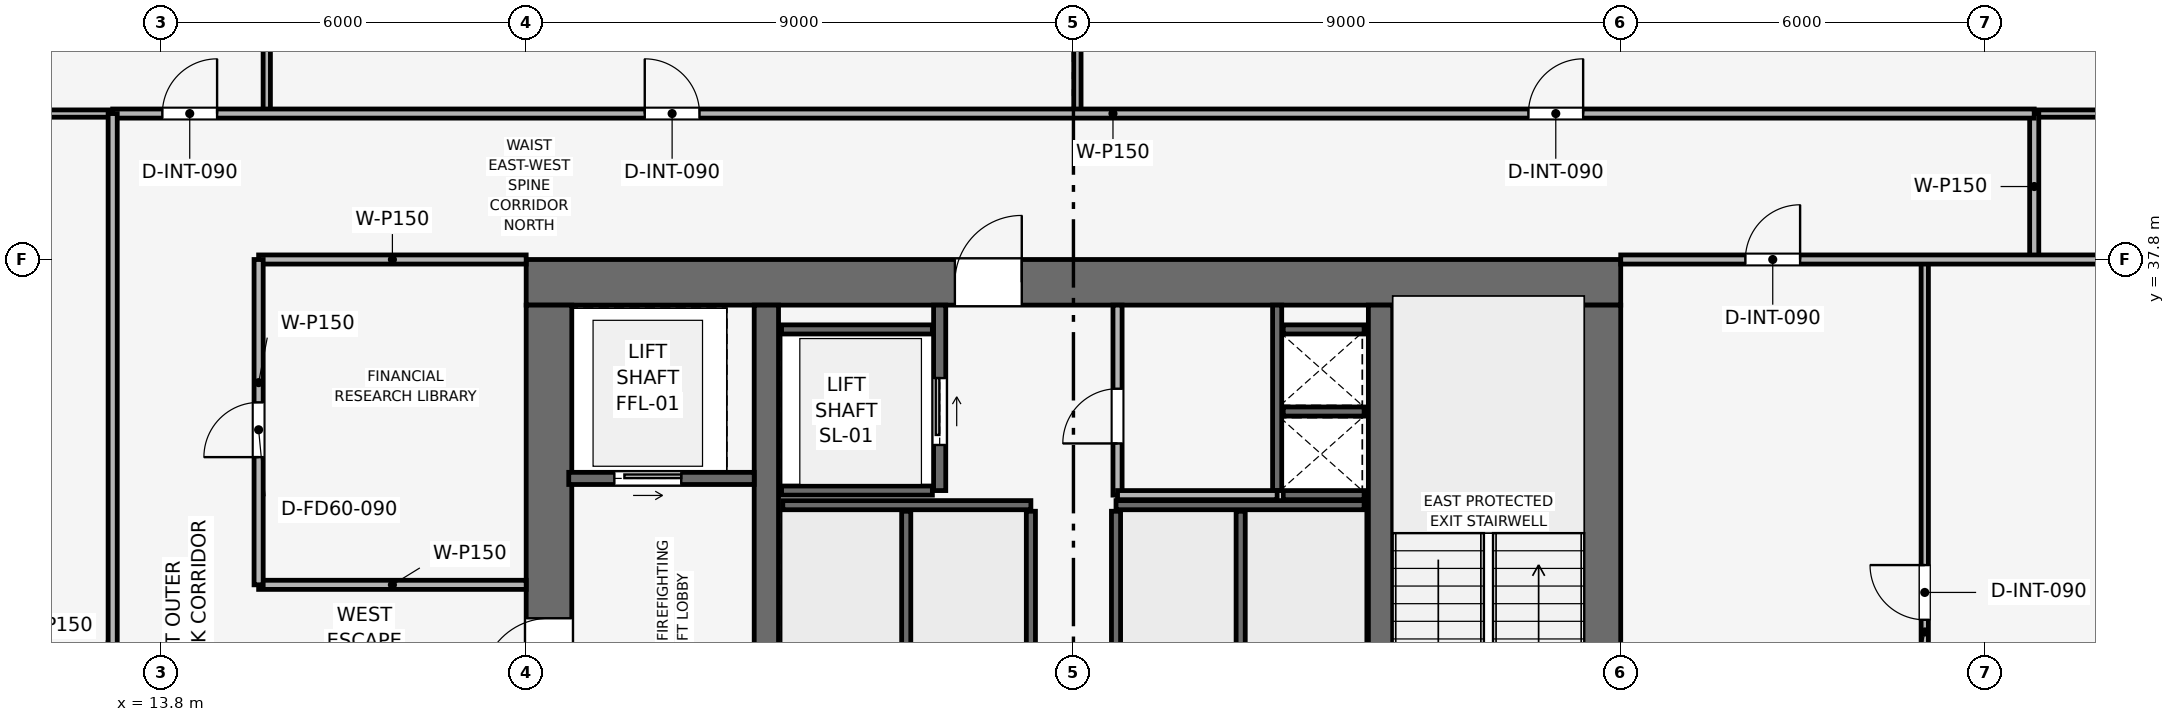
"""IFC4 building model, lengths in metres.
Left out: names, types, materials, properties, quantities, classifications, styles, units other than length and angle.
Written with IfcOpenShell. Run it as: python <this file> out.ifc"""

import sys

from ifc_helpers import new_model, si_unit, direction, frame, frame_2d, origin, place, context, subcontext, project, spatial, rectangle, extrude, element, fill, save


model = new_model("IFC4")
c1 = context("Model", 3, precision=1e-05, world=origin(), true_north=direction((0.0, 1.0)))
c2 = subcontext(c1, "Body", "Model", "MODEL_VIEW")
j1 = project(units=[si_unit("LENGTHUNIT", "METRE"), si_unit("PLANEANGLEUNIT", "RADIAN")], contexts=[c1])
p1 = place(None, origin())
s1 = spatial("IfcSite", under=j1, at=p1, CompositionType="ELEMENT")
p2 = place(p1, origin())
s2 = spatial("IfcBuilding", under=s1, at=p2, CompositionType="ELEMENT")
p3 = place(p2, frame((0.0, 0.0, 226.2)))
s3 = spatial("IfcBuildingStorey", under=s2, at=p3, CompositionType="ELEMENT", Elevation=226.2)
p4 = place(p3, frame((19.8, 37.425, 0.0), z_axis=(0.0, 0.0, 1.0), x_axis=(1.0, 0.0, 0.0)))
e1 = element("IfcWall", 1, at=p4, inside=s3, PredefinedType="SHEAR", context=c2, shape_type="SweptSolid", body=[
    extrude(rectangle(XDim=18.0, YDim=0.75, at=frame_2d((9.0, 0.0))), origin(), (0.0, 0.0, 1.0), 3.75),
])
p5 = place(p4, frame((7.05, 0.0, 0.0)))
e2 = element("IfcOpeningElement", 2, at=p5, cuts=e1, PredefinedType="OPENING", context=c2, shape_type="SweptSolid", body=[
    extrude(rectangle(XDim=1.1, YDim=2.15, at=frame_2d((0.55, 1.075))), frame((0.0, 0.385, 0.0), z_axis=(0.0, -1.0, 0.0), x_axis=(1.0, 0.0, 0.0)), (0.0, 0.0, 1.0), 0.77),
])
p6 = place(p3, frame((20.175, 20.55, 0.0), z_axis=(0.0, 0.0, 1.0), x_axis=(0.0, 1.0, 0.0)))
e3 = element("IfcWall", 3, at=p6, inside=s3, PredefinedType="SHEAR", context=c2, shape_type="SweptSolid", body=[
    extrude(rectangle(XDim=16.5, YDim=0.75, at=frame_2d((8.25, 0.0))), origin(), (0.0, 0.0, 1.0), 3.75),
])
p7 = place(p6, frame((10.25, 0.0, 0.0)))
e4 = element("IfcOpeningElement", 4, at=p7, cuts=e3, PredefinedType="OPENING", context=c2, shape_type="SweptSolid", body=[
    extrude(rectangle(XDim=1.1, YDim=2.15, at=frame_2d((0.55, 1.075))), frame((0.0, 0.385, 0.0), z_axis=(0.0, -1.0, 0.0), x_axis=(1.0, 0.0, 0.0)), (0.0, 0.0, 1.0), 0.77),
])
p8 = place(p3, frame((37.425, 20.55, 0.0), z_axis=(0.0, 0.0, 1.0), x_axis=(0.0, 1.0, 0.0)))
e5 = element("IfcWall", 5, at=p8, inside=s3, PredefinedType="SHEAR", context=c2, shape_type="SweptSolid", body=[
    extrude(rectangle(XDim=16.5, YDim=0.75, at=frame_2d((8.25, 0.0))), origin(), (0.0, 0.0, 1.0), 3.75),
])
p9 = place(p8, frame((4.75, 0.0, 0.0)))
e6 = element("IfcOpeningElement", 6, at=p9, cuts=e5, PredefinedType="OPENING", context=c2, shape_type="SweptSolid", body=[
    extrude(rectangle(XDim=1.1, YDim=2.15, at=frame_2d((0.55, 1.075))), frame((0.0, 0.385, 0.0), z_axis=(0.0, -1.0, 0.0), x_axis=(1.0, 0.0, 0.0)), (0.0, 0.0, 1.0), 0.77),
])
for number, where, z_axis, x_axis in (
    (7, (23.75, 20.55, 0.0), (0.0, 0.0, 1.0), (0.0, 1.0, 0.0)),
    (8, (33.85, 20.55, 0.0), (0.0, 0.0, 1.0), (0.0, 1.0, 0.0)),
):
    element("IfcWall", number, at=place(p3, frame(where, z_axis=z_axis, x_axis=x_axis)), inside=s3, PredefinedType="SHEAR", context=c2, shape_type="SweptSolid", body=[
        extrude(rectangle(XDim=16.5, YDim=0.4, at=frame_2d((8.25, 0.0))), origin(), (0.0, 0.0, 1.0), 3.75),
    ])
p10 = place(p3, frame((32.15, 34.0, 0.0), z_axis=(0.0, 0.0, 1.0), x_axis=(0.0, 1.0, 0.0)))
e9 = element("IfcWall", 9, at=p10, inside=s3, PredefinedType="SHEAR", context=c2, shape_type="SweptSolid", body=[
    extrude(rectangle(XDim=3.05, YDim=0.15, at=frame_2d((1.525, 0.0))), origin(), (0.0, 0.0, 1.0), 3.5),
])
for number, where, z_axis, x_axis in (
    (10, (32.25, 33.925, 0.0), (0.0, 0.0, 1.0), (1.0, 0.0, 0.0)),
    (11, (32.25, 35.3, 0.0), (0.0, 0.0, 1.0), (1.0, 0.0, 0.0)),
):
    element("IfcWall", number, at=place(p3, frame(where, z_axis=z_axis, x_axis=x_axis)), inside=s3, PredefinedType="SHEAR", context=c2, shape_type="SweptSolid", body=[
        extrude(rectangle(XDim=1.33, YDim=0.15, at=frame_2d((0.665, 0.0))), origin(), (0.0, 0.0, 1.0), 3.5),
    ])
p11 = place(p3, frame((20.5, 34.2, 0.0), z_axis=(0.0, 0.0, 1.0), x_axis=(1.0, 0.0, 0.0)))
e12 = element("IfcWall", 12, at=p11, inside=s3, PredefinedType="SHEAR", context=c2, shape_type="SweptSolid", body=[
    extrude(rectangle(XDim=3.05, YDim=0.2, at=frame_2d((1.525, 0.0))), origin(), (0.0, 0.0, 1.0), 3.5),
])
p12 = place(p11, frame((0.75, 0.0, 0.0)))
e13 = element("IfcOpeningElement", 13, at=p12, cuts=e12, PredefinedType="OPENING", context=c2, shape_type="SweptSolid", body=[
    extrude(rectangle(XDim=1.1, YDim=2.15, at=frame_2d((0.55, 1.075))), frame((0.0, 0.11, 0.0), z_axis=(0.0, -1.0, 0.0), x_axis=(1.0, 0.0, 0.0)), (0.0, 0.0, 1.0), 0.22),
])
p13 = place(p3, frame((26.6, 34.0, 0.0), z_axis=(0.0, 0.0, 1.0), x_axis=(0.0, 1.0, 0.0)))
e14 = element("IfcWall", 14, at=p13, inside=s3, PredefinedType="SHEAR", context=c2, shape_type="SweptSolid", body=[
    extrude(rectangle(XDim=3.05, YDim=0.2, at=frame_2d((1.525, 0.0))), origin(), (0.0, 0.0, 1.0), 3.5),
])
p14 = place(p13, frame((0.75, 0.0, 0.0)))
e15 = element("IfcOpeningElement", 15, at=p14, cuts=e14, PredefinedType="OPENING", context=c2, shape_type="SweptSolid", body=[
    extrude(rectangle(XDim=1.1, YDim=2.15, at=frame_2d((0.55, 1.075))), frame((0.0, 0.11, 0.0), z_axis=(0.0, -1.0, 0.0), x_axis=(1.0, 0.0, 0.0)), (0.0, 0.0, 1.0), 0.22),
])
for number, where, z_axis, x_axis in (
    (16, (24.0, 34.0, 0.0), (0.0, 0.0, 1.0), (1.0, 0.0, 0.0)),
    (17, (24.0, 36.65, 0.0), (0.0, 0.0, 1.0), (1.0, 0.0, 0.0)),
):
    element("IfcWall", number, at=place(p3, frame(where, z_axis=z_axis, x_axis=x_axis)), inside=s3, PredefinedType="SHEAR", context=c2, shape_type="SweptSolid", body=[
        extrude(rectangle(XDim=2.48, YDim=0.15, at=frame_2d((1.24, 0.0))), origin(), (0.0, 0.0, 1.0), 3.5),
    ])
p15 = place(p3, frame((32.25, 36.65, 0.0), z_axis=(0.0, 0.0, 1.0), x_axis=(1.0, 0.0, 0.0)))
e18 = element("IfcWall", 18, at=p15, inside=s3, PredefinedType="SHEAR", context=c2, shape_type="SweptSolid", body=[
    extrude(rectangle(XDim=1.33, YDim=0.15, at=frame_2d((0.665, 0.0))), origin(), (0.0, 0.0, 1.0), 3.5),
])
for number, where, z_axis, x_axis in (
    (19, (24.02, 33.76, 0.0), (0.0, 0.0, 1.0), (1.0, 0.0, 0.0)),
    (20, (29.5, 33.76, 0.0), (0.0, 0.0, 1.0), (1.0, 0.0, 0.0)),
):
    element("IfcWall", number, at=place(p3, frame(where, z_axis=z_axis, x_axis=x_axis)), inside=s3, PredefinedType="SHEAR", context=c2, shape_type="SweptSolid", body=[
        extrude(rectangle(XDim=4.08, YDim=0.15, at=frame_2d((2.04, 0.0))), origin(), (0.0, 0.0, 1.0), 3.5),
    ])
for number, where, z_axis, x_axis in (
    (21, (26.05, 31.42, 0.0), (0.0, 0.0, 1.0), (0.0, 1.0, 0.0)),
    (22, (28.1, 31.42, 0.0), (0.0, 0.0, 1.0), (0.0, 1.0, 0.0)),
    (23, (29.5, 31.42, 0.0), (0.0, 0.0, 1.0), (0.0, 1.0, 0.0)),
    (24, (31.55, 31.42, 0.0), (0.0, 0.0, 1.0), (0.0, 1.0, 0.0)),
):
    element("IfcWall", number, at=place(p3, frame(where, z_axis=z_axis, x_axis=x_axis)), inside=s3, PredefinedType="SHEAR", context=c2, shape_type="SweptSolid", body=[
        extrude(rectangle(XDim=2.24, YDim=0.15, at=frame_2d((1.12, 0.0))), origin(), (0.0, 0.0, 1.0), 3.5),
    ])
p16 = place(p3, frame((29.525, 33.925, 0.0), z_axis=(0.0, 0.0, 1.0), x_axis=(0.0, 1.0, 0.0)))
e25 = element("IfcWall", 25, at=p16, inside=s3, PredefinedType="PARTITIONING", context=c2, shape_type="SweptSolid", body=[
    extrude(rectangle(XDim=3.125, YDim=0.15, at=frame_2d((1.562, 0.0))), origin(), (0.0, 0.0, 1.0), 3.5),
])
p17 = place(p16, frame((0.85, 0.0, 0.0)))
e26 = element("IfcOpeningElement", 26, at=p17, cuts=e25, PredefinedType="OPENING", context=c2, shape_type="SweptSolid", body=[
    extrude(rectangle(XDim=0.9, YDim=2.1, at=frame_2d((0.45, 1.05))), frame((0.0, 0.085, 0.0), z_axis=(0.0, -1.0, 0.0), x_axis=(1.0, 0.0, 0.0)), (0.0, 0.0, 1.0), 0.17),
])
p18 = place(p3, frame((29.525, 33.925, 0.0), z_axis=(0.0, 0.0, 1.0), x_axis=(1.0, 0.0, 0.0)))
e27 = element("IfcWall", 27, at=p18, inside=s3, PredefinedType="PARTITIONING", context=c2, shape_type="SweptSolid", body=[
    extrude(rectangle(XDim=2.625, YDim=0.15, at=frame_2d((1.312, 0.0))), origin(), (0.0, 0.0, 1.0), 3.5),
])
p19 = place(p3, frame((15.4, 32.45, 0.0), z_axis=(0.0, 0.0, 1.0), x_axis=(1.0, 0.0, 0.0)))
e28 = element("IfcWall", 28, at=p19, inside=s3, PredefinedType="PARTITIONING", context=c2, shape_type="SweptSolid", body=[
    extrude(rectangle(XDim=4.4, YDim=0.15, at=frame_2d((2.2, 0.0))), origin(), (0.0, 0.0, 1.0), 3.5),
])
p20 = place(p3, frame((15.4, 37.8, 0.0), z_axis=(0.0, 0.0, 1.0), x_axis=(1.0, 0.0, 0.0)))
e29 = element("IfcWall", 29, at=p20, inside=s3, PredefinedType="PARTITIONING", context=c2, shape_type="SweptSolid", body=[
    extrude(rectangle(XDim=4.4, YDim=0.15, at=frame_2d((2.2, 0.0))), origin(), (0.0, 0.0, 1.0), 3.035),
])
p21 = place(p3, frame((15.4, 32.45, 0.0), z_axis=(0.0, 0.0, 1.0), x_axis=(0.0, 1.0, 0.0)))
e30 = element("IfcWall", 30, at=p21, inside=s3, PredefinedType="PARTITIONING", context=c2, shape_type="SweptSolid", body=[
    extrude(rectangle(XDim=5.35, YDim=0.15, at=frame_2d((2.675, 0.0))), origin(), (0.0, 0.0, 1.0), 3.035),
])
p22 = place(p21, frame((2.1, 0.0, 0.0)))
e31 = element("IfcOpeningElement", 31, at=p22, cuts=e30, PredefinedType="OPENING", context=c2, shape_type="SweptSolid", body=[
    extrude(rectangle(XDim=0.9, YDim=2.1, at=frame_2d((0.45, 1.05))), frame((0.0, 0.085, 0.0), z_axis=(0.0, -1.0, 0.0), x_axis=(1.0, 0.0, 0.0)), (0.0, 0.0, 1.0), 0.17),
])
p23 = place(p3, frame((15.534, 40.2, 0.0), z_axis=(0.0, 0.0, 1.0), x_axis=(0.0, 1.0, 0.0)))
e32 = element("IfcWall", 32, at=p23, inside=s3, PredefinedType="PARTITIONING", context=c2, shape_type="SweptSolid", body=[
    extrude(rectangle(XDim=15.47, YDim=0.12, at=frame_2d((7.735, 0.0))), origin(), (0.0, 0.0, 1.0), 2.885),
])
p24 = place(p3, frame((28.865, 40.2, 0.0), z_axis=(0.0, 0.0, 1.0), x_axis=(0.0, 1.0, 0.0)))
e33 = element("IfcWall", 33, at=p24, inside=s3, PredefinedType="PARTITIONING", context=c2, shape_type="SweptSolid", body=[
    extrude(rectangle(XDim=15.47, YDim=0.12, at=frame_2d((7.735, 0.0))), origin(), (0.0, 0.0, 1.0), 2.985),
])
p25 = place(p3, frame((42.8, 26.85, 0.0), z_axis=(0.0, 0.0, 1.0), x_axis=(0.0, 1.0, 0.0)))
e34 = element("IfcWall", 34, at=p25, inside=s3, PredefinedType="PARTITIONING", context=c2, shape_type="SweptSolid", body=[
    extrude(rectangle(XDim=10.95, YDim=0.12, at=frame_2d((5.475, 0.0))), origin(), (0.0, 0.0, 1.0), 3.035),
])
p26 = place(p25, frame((5.025, 0.0, 0.0)))
e35 = element("IfcOpeningElement", 35, at=p26, cuts=e34, PredefinedType="OPENING", context=c2, shape_type="SweptSolid", body=[
    extrude(rectangle(XDim=0.9, YDim=2.1, at=frame_2d((0.45, 1.05))), frame((0.0, 0.07, 0.0), z_axis=(0.0, -1.0, 0.0), x_axis=(1.0, 0.0, 0.0)), (0.0, 0.0, 1.0), 0.14),
])
p27 = place(p3, frame((1.93, 40.2, 0.0), z_axis=(0.0, 0.0, 1.0), x_axis=(1.0, 0.0, 0.0)))
e36 = element("IfcWall", 36, at=p27, inside=s3, PredefinedType="PARTITIONING", context=c2, shape_type="SweptSolid", body=[
    extrude(rectangle(XDim=11.07, YDim=0.12, at=frame_2d((5.535, 0.0))), origin(), (0.0, 0.0, 1.0), 2.885),
])
p28 = place(p3, frame((44.6, 40.2, 0.0), z_axis=(0.0, 0.0, 1.0), x_axis=(1.0, 0.0, 0.0)))
e37 = element("IfcWall", 37, at=p28, inside=s3, PredefinedType="PARTITIONING", context=c2, shape_type="SweptSolid", body=[
    extrude(rectangle(XDim=11.07, YDim=0.12, at=frame_2d((5.535, 0.0))), origin(), (0.0, 0.0, 1.0), 2.885),
])
p29 = place(p3, frame((44.6, 37.8, 0.0), z_axis=(0.0, 0.0, 1.0), x_axis=(0.0, 1.0, 0.0)))
e38 = element("IfcWall", 38, at=p29, inside=s3, PredefinedType="PARTITIONING", context=c2, shape_type="SweptSolid", body=[
    extrude(rectangle(XDim=2.4, YDim=0.15, at=frame_2d((1.2, 0.0))), origin(), (0.0, 0.0, 1.0), 3.5),
])
p30 = place(p3, frame((37.8, 37.8, 0.0), z_axis=(0.0, 0.0, 1.0), x_axis=(1.0, 0.0, 0.0)))
e39 = element("IfcWall", 39, at=p30, inside=s3, PredefinedType="PARTITIONING", context=c2, shape_type="SweptSolid", body=[
    extrude(rectangle(XDim=17.87, YDim=0.15, at=frame_2d((8.935, 0.0))), origin(), (0.0, 0.0, 1.0), 2.885),
])
p31 = place(p30, frame((2.05, 0.0, 0.0)))
e40 = element("IfcOpeningElement", 40, at=p31, cuts=e39, PredefinedType="OPENING", context=c2, shape_type="SweptSolid", body=[
    extrude(rectangle(XDim=0.9, YDim=2.1, at=frame_2d((0.45, 1.05))), frame((0.0, 0.085, 0.0), z_axis=(0.0, -1.0, 0.0), x_axis=(1.0, 0.0, 0.0)), (0.0, 0.0, 1.0), 0.17),
])
p32 = place(p3, frame((13.0, 40.2, 0.0), z_axis=(0.0, 0.0, 1.0), x_axis=(1.0, 0.0, 0.0)))
e41 = element("IfcWall", 41, at=p32, inside=s3, PredefinedType="PARTITIONING", context=c2, shape_type="SweptSolid", body=[
    extrude(rectangle(XDim=31.6, YDim=0.15, at=frame_2d((15.8, 0.0))), origin(), (0.0, 0.0, 1.0), 3.035),
])
p33 = place(p32, frame((0.817, 0.0, 0.0)))
e42 = element("IfcOpeningElement", 42, at=p33, cuts=e41, PredefinedType="OPENING", context=c2, shape_type="SweptSolid", body=[
    extrude(rectangle(XDim=0.9, YDim=2.1, at=frame_2d((0.45, 1.05))), frame((0.0, 0.085, 0.0), z_axis=(0.0, -1.0, 0.0), x_axis=(1.0, 0.0, 0.0)), (0.0, 0.0, 1.0), 0.17),
])
p34 = place(p32, frame((8.75, 0.0, 0.0)))
e43 = element("IfcOpeningElement", 43, at=p34, cuts=e41, PredefinedType="OPENING", context=c2, shape_type="SweptSolid", body=[
    extrude(rectangle(XDim=0.9, YDim=2.1, at=frame_2d((0.45, 1.05))), frame((0.0, 0.085, 0.0), z_axis=(0.0, -1.0, 0.0), x_axis=(1.0, 0.0, 0.0)), (0.0, 0.0, 1.0), 0.17),
])
p35 = place(p32, frame((23.282, 0.0, 0.0)))
e44 = element("IfcOpeningElement", 44, at=p35, cuts=e41, PredefinedType="OPENING", context=c2, shape_type="SweptSolid", body=[
    extrude(rectangle(XDim=0.9, YDim=2.1, at=frame_2d((0.45, 1.05))), frame((0.0, 0.085, 0.0), z_axis=(0.0, -1.0, 0.0), x_axis=(1.0, 0.0, 0.0)), (0.0, 0.0, 1.0), 0.17),
])
p36 = place(p3, frame((13.0, 17.4, 0.0), z_axis=(0.0, 0.0, 1.0), x_axis=(0.0, 1.0, 0.0)))
e45 = element("IfcWall", 45, at=p36, inside=s3, PredefinedType="PARTITIONING", context=c2, shape_type="SweptSolid", body=[
    extrude(rectangle(XDim=22.8, YDim=0.15, at=frame_2d((11.4, 0.0))), origin(), (0.0, 0.0, 1.0), 3.035),
])
p37 = place(p36, frame((10.95, 0.0, 0.0)))
e46 = element("IfcOpeningElement", 46, at=p37, cuts=e45, PredefinedType="OPENING", context=c2, shape_type="SweptSolid", body=[
    extrude(rectangle(XDim=0.9, YDim=2.1, at=frame_2d((0.45, 1.05))), frame((0.0, 0.085, 0.0), z_axis=(0.0, -1.0, 0.0), x_axis=(1.0, 0.0, 0.0)), (0.0, 0.0, 1.0), 0.17),
])
p38 = place(p12, origin())
e47 = element("IfcDoor", 47, at=p38, inside=s3, OperationType="SLIDING_TO_RIGHT", PredefinedType="DOOR", context=c2, shape_type="SweptSolid", body=[
    extrude(rectangle(XDim=1.1, YDim=2.15, at=frame_2d((0.55, 1.075))), frame((0.0, 0.025, 0.0), z_axis=(0.0, -1.0, 0.0), x_axis=(1.0, 0.0, 0.0)), (0.0, 0.0, 1.0), 0.05),
])
fill(e13, e47)
p39 = place(p14, origin())
e48 = element("IfcDoor", 48, at=p39, inside=s3, OperationType="SLIDING_TO_RIGHT", PredefinedType="DOOR", context=c2, shape_type="SweptSolid", body=[
    extrude(rectangle(XDim=1.1, YDim=2.15, at=frame_2d((0.55, 1.075))), frame((0.0, 0.025, 0.0), z_axis=(0.0, -1.0, 0.0), x_axis=(1.0, 0.0, 0.0)), (0.0, 0.0, 1.0), 0.05),
])
fill(e15, e48)
p40 = place(p17, origin())
e49 = element("IfcDoor", 49, at=p40, inside=s3, OperationType="SINGLE_SWING_LEFT", PredefinedType="DOOR", context=c2, shape_type="SweptSolid", body=[
    extrude(rectangle(XDim=0.9, YDim=2.1, at=frame_2d((0.45, 1.05))), frame((0.0, 0.025, 0.0), z_axis=(0.0, -1.0, 0.0), x_axis=(1.0, 0.0, 0.0)), (0.0, 0.0, 1.0), 0.05),
])
fill(e26, e49)
p41 = place(p22, origin())
e50 = element("IfcDoor", 50, at=p41, inside=s3, OperationType="SINGLE_SWING_LEFT", PredefinedType="DOOR", context=c2, shape_type="SweptSolid", body=[
    extrude(rectangle(XDim=0.9, YDim=2.1, at=frame_2d((0.45, 1.05))), frame((0.0, 0.025, 0.0), z_axis=(0.0, -1.0, 0.0), x_axis=(1.0, 0.0, 0.0)), (0.0, 0.0, 1.0), 0.05),
])
fill(e31, e50)
p42 = place(p26, origin())
e51 = element("IfcDoor", 51, at=p42, inside=s3, OperationType="SINGLE_SWING_RIGHT", PredefinedType="DOOR", context=c2, shape_type="SweptSolid", body=[
    extrude(rectangle(XDim=0.9, YDim=2.1, at=frame_2d((0.45, 1.05))), frame((0.0, 0.025, 0.0), z_axis=(0.0, -1.0, 0.0), x_axis=(1.0, 0.0, 0.0)), (0.0, 0.0, 1.0), 0.05),
])
fill(e35, e51)
p43 = place(p31, origin())
e52 = element("IfcDoor", 52, at=p43, inside=s3, OperationType="SINGLE_SWING_RIGHT", PredefinedType="DOOR", context=c2, shape_type="SweptSolid", body=[
    extrude(rectangle(XDim=0.9, YDim=2.1, at=frame_2d((0.45, 1.05))), frame((0.0, 0.025, 0.0), z_axis=(0.0, -1.0, 0.0), x_axis=(1.0, 0.0, 0.0)), (0.0, 0.0, 1.0), 0.05),
])
fill(e40, e52)
p44 = place(p33, origin())
e53 = element("IfcDoor", 53, at=p44, inside=s3, OperationType="SINGLE_SWING_RIGHT", PredefinedType="DOOR", context=c2, shape_type="SweptSolid", body=[
    extrude(rectangle(XDim=0.9, YDim=2.1, at=frame_2d((0.45, 1.05))), frame((0.0, 0.025, 0.0), z_axis=(0.0, -1.0, 0.0), x_axis=(1.0, 0.0, 0.0)), (0.0, 0.0, 1.0), 0.05),
])
fill(e42, e53)
p45 = place(p34, origin())
e54 = element("IfcDoor", 54, at=p45, inside=s3, OperationType="SINGLE_SWING_LEFT", PredefinedType="DOOR", context=c2, shape_type="SweptSolid", body=[
    extrude(rectangle(XDim=0.9, YDim=2.1, at=frame_2d((0.45, 1.05))), frame((0.0, 0.025, 0.0), z_axis=(0.0, -1.0, 0.0), x_axis=(1.0, 0.0, 0.0)), (0.0, 0.0, 1.0), 0.05),
])
fill(e43, e54)
p46 = place(p35, origin())
e55 = element("IfcDoor", 55, at=p46, inside=s3, OperationType="SINGLE_SWING_RIGHT", PredefinedType="DOOR", context=c2, shape_type="SweptSolid", body=[
    extrude(rectangle(XDim=0.9, YDim=2.1, at=frame_2d((0.45, 1.05))), frame((0.0, 0.025, 0.0), z_axis=(0.0, -1.0, 0.0), x_axis=(1.0, 0.0, 0.0)), (0.0, 0.0, 1.0), 0.05),
])
fill(e44, e55)
p47 = place(p7, origin())
e56 = element("IfcDoor", 56, at=p47, inside=s3, OperationType="SINGLE_SWING_LEFT", PredefinedType="DOOR", context=c2, shape_type="SweptSolid", body=[
    extrude(rectangle(XDim=1.1, YDim=2.15, at=frame_2d((0.55, 1.075))), frame((0.0, 0.025, 0.0), z_axis=(0.0, -1.0, 0.0), x_axis=(1.0, 0.0, 0.0)), (0.0, 0.0, 1.0), 0.05),
])
fill(e4, e56)
p48 = place(p5, origin())
e57 = element("IfcDoor", 57, at=p48, inside=s3, OperationType="SINGLE_SWING_RIGHT", PredefinedType="DOOR", context=c2, shape_type="SweptSolid", body=[
    extrude(rectangle(XDim=1.1, YDim=2.15, at=frame_2d((0.55, 1.075))), frame((0.0, 0.025, 0.0), z_axis=(0.0, -1.0, 0.0), x_axis=(1.0, 0.0, 0.0)), (0.0, 0.0, 1.0), 0.05),
])
fill(e2, e57)
save(model, sys.argv[1])
